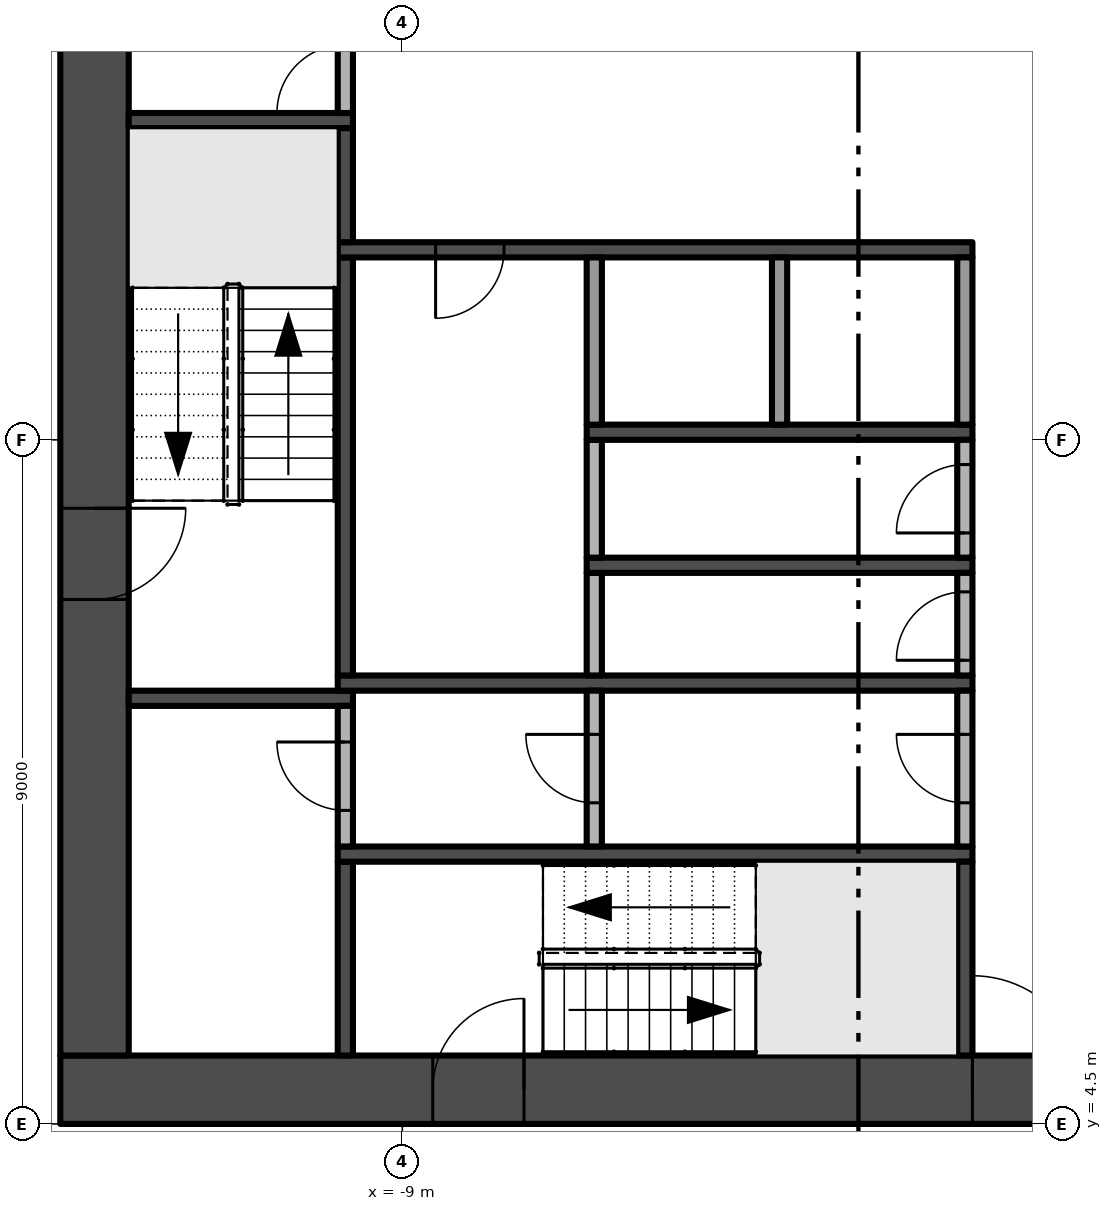
"""IFC4 building model, lengths in metres.
Left out: names, types, materials, properties, quantities, classifications, styles, units other than length and angle.
Written with IfcOpenShell. Run it as: python <this file> out.ifc"""

import sys

from ifc_helpers import new_model, si_unit, direction, frame, frame_2d, origin, place, context, subcontext, project, spatial, rectangle, extrude, element, fill, save


model = new_model("IFC4")
c1 = context("Model", 3, precision=1e-05, world=origin(), true_north=direction((0.0, 1.0)))
c2 = subcontext(c1, "Body", "Model", "MODEL_VIEW")
j1 = project(units=[si_unit("LENGTHUNIT", "METRE"), si_unit("PLANEANGLEUNIT", "RADIAN")], contexts=[c1])
p1 = place(None, origin())
s1 = spatial("IfcSite", under=j1, at=p1, CompositionType="ELEMENT")
p2 = place(p1, origin())
s2 = spatial("IfcBuilding", under=s1, at=p2, CompositionType="ELEMENT")
p3 = place(p2, frame((0.0, 0.0, 49.2)))
s3 = spatial("IfcBuildingStorey", under=s2, at=p3, CompositionType="ELEMENT", Elevation=49.2)
p4 = place(p3, frame((-13.5, 4.95, -0.3), z_axis=(0.0, 0.0, 1.0), x_axis=(1.0, 0.0, 0.0)))
e1 = element("IfcWall", 1, at=p4, inside=s3, PredefinedType="SHEAR", context=c2, shape_type="SweptSolid", body=[
    extrude(rectangle(XDim=27.0, YDim=0.9, at=frame_2d((13.5, 0.0))), origin(), (0.0, 0.0, 1.0), 3.8),
])
p5 = place(p4, frame((12.0, 0.0, 0.3)))
e2 = element("IfcOpeningElement", 2, at=p5, cuts=e1, PredefinedType="OPENING", context=c2, shape_type="SweptSolid", body=[
    extrude(rectangle(XDim=3.0, YDim=2.4, at=frame_2d((1.5, 1.2))), frame((0.0, 0.46, 0.0), z_axis=(0.0, -1.0, 0.0), x_axis=(1.0, 0.0, 0.0)), (0.0, 0.0, 1.0), 0.92),
])
p6 = place(p4, frame((4.9, 0.0, 0.3)))
e3 = element("IfcOpeningElement", 3, at=p6, cuts=e1, PredefinedType="OPENING", context=c2, shape_type="SweptSolid", body=[
    extrude(rectangle(XDim=1.2, YDim=2.2, at=frame_2d((0.6, 1.1))), frame((0.0, 0.46, 0.0), z_axis=(0.0, -1.0, 0.0), x_axis=(1.0, 0.0, 0.0)), (0.0, 0.0, 1.0), 0.92),
])
p7 = place(p4, frame((20.75, 0.0, 0.3)))
e4 = element("IfcOpeningElement", 4, at=p7, cuts=e1, PredefinedType="OPENING", context=c2, shape_type="SweptSolid", body=[
    extrude(rectangle(XDim=1.5, YDim=2.2, at=frame_2d((0.75, 1.1))), frame((0.0, 0.46, 0.0), z_axis=(0.0, -1.0, 0.0), x_axis=(1.0, 0.0, 0.0)), (0.0, 0.0, 1.0), 0.92),
])
p8 = place(p4, frame((17.4, 0.0, 0.3)))
e5 = element("IfcOpeningElement", 5, at=p8, cuts=e1, PredefinedType="OPENING", context=c2, shape_type="SweptSolid", body=[
    extrude(rectangle(XDim=1.2, YDim=2.2, at=frame_2d((0.6, 1.1))), frame((0.0, 0.46, 0.0), z_axis=(0.0, -1.0, 0.0), x_axis=(1.0, 0.0, 0.0)), (0.0, 0.0, 1.0), 0.92),
])
p9 = place(p3, frame((-13.05, 21.6, -0.3), z_axis=(0.0, 0.0, 1.0), x_axis=(0.0, -1.0, 0.0)))
e6 = element("IfcWall", 6, at=p9, inside=s3, PredefinedType="SHEAR", context=c2, shape_type="SweptSolid", body=[
    extrude(rectangle(XDim=16.2, YDim=0.9, at=frame_2d((8.1, 0.0))), origin(), (0.0, 0.0, 1.0), 3.8),
])
p10 = place(p9, frame((9.0, 0.0, 0.3)))
e7 = element("IfcOpeningElement", 7, at=p10, cuts=e6, PredefinedType="OPENING", context=c2, shape_type="SweptSolid", body=[
    extrude(rectangle(XDim=1.2, YDim=2.2, at=frame_2d((0.6, 1.1))), frame((0.0, 0.46, 0.0), z_axis=(0.0, -1.0, 0.0), x_axis=(1.0, 0.0, 0.0)), (0.0, 0.0, 1.0), 0.92),
])
for number, where, z_axis, x_axis in (
    (8, (-12.6, 10.1, 0.0), (0.0, 0.0, 1.0), (1.0, 0.0, 0.0)),
    (9, (-12.6, 17.7, 0.0), (0.0, 0.0, 1.0), (1.0, 0.0, 0.0)),
):
    element("IfcWall", number, at=place(p3, frame(where, z_axis=z_axis, x_axis=x_axis)), inside=s3, PredefinedType="SHEAR", context=c2, shape_type="SweptSolid", body=[
        extrude(rectangle(XDim=2.95, YDim=0.2, at=frame_2d((1.475, 0.0))), origin(), (0.0, 0.0, 1.0), 3.5),
    ])
p11 = place(p3, frame((-9.75, 5.4, 0.0), z_axis=(0.0, 0.0, 1.0), x_axis=(0.0, 1.0, 0.0)))
e10 = element("IfcWall", 10, at=p11, inside=s3, PredefinedType="SHEAR", context=c2, shape_type="SweptSolid", body=[
    extrude(rectangle(XDim=2.55, YDim=0.2, at=frame_2d((1.275, 0.0))), origin(), (0.0, 0.0, 1.0), 3.5),
])
p12 = place(p3, frame((-9.85, 8.05, 0.0), z_axis=(0.0, 0.0, 1.0), x_axis=(1.0, 0.0, 0.0)))
e11 = element("IfcWall", 11, at=p12, inside=s3, PredefinedType="SHEAR", context=c2, shape_type="SweptSolid", body=[
    extrude(rectangle(XDim=8.35, YDim=0.2, at=frame_2d((4.175, 0.0))), origin(), (0.0, 0.0, 1.0), 3.5),
])
p13 = place(p3, frame((-9.75, 8.15, 0.0), z_axis=(0.0, 0.0, 1.0), x_axis=(0.0, 1.0, 0.0)))
e12 = element("IfcWall", 12, at=p13, inside=s3, PredefinedType="PARTITIONING", context=c2, shape_type="SweptSolid", body=[
    extrude(rectangle(XDim=1.85, YDim=0.2, at=frame_2d((0.925, 0.0))), origin(), (0.0, 0.0, 1.0), 3.5),
])
p14 = place(p13, frame((0.475, 0.0, 0.0)))
e13 = element("IfcOpeningElement", 13, at=p14, cuts=e12, PredefinedType="OPENING", context=c2, shape_type="SweptSolid", body=[
    extrude(rectangle(XDim=0.9, YDim=2.1, at=frame_2d((0.45, 1.05))), frame((0.0, 0.11, 0.0), z_axis=(0.0, -1.0, 0.0), x_axis=(1.0, 0.0, 0.0)), (0.0, 0.0, 1.0), 0.22),
])
p15 = place(p3, frame((-9.85, 10.3, 0.0), z_axis=(0.0, 0.0, 1.0), x_axis=(1.0, 0.0, 0.0)))
e14 = element("IfcWall", 14, at=p15, inside=s3, PredefinedType="SHEAR", context=c2, shape_type="SweptSolid", body=[
    extrude(rectangle(XDim=8.35, YDim=0.2, at=frame_2d((4.175, 0.0))), origin(), (0.0, 0.0, 1.0), 3.5),
])
p16 = place(p3, frame((-9.75, 10.4, 0.0), z_axis=(0.0, 0.0, 1.0), x_axis=(0.0, 1.0, 0.0)))
e15 = element("IfcWall", 15, at=p16, inside=s3, PredefinedType="SHEAR", context=c2, shape_type="SweptSolid", body=[
    extrude(rectangle(XDim=5.5, YDim=0.2, at=frame_2d((2.75, 0.0))), origin(), (0.0, 0.0, 1.0), 3.5),
])
p17 = place(p3, frame((-1.5, 16.0, 0.0), z_axis=(0.0, 0.0, 1.0), x_axis=(-1.0, 0.0, 0.0)))
e16 = element("IfcWall", 16, at=p17, inside=s3, PredefinedType="SHEAR", context=c2, shape_type="SweptSolid", body=[
    extrude(rectangle(XDim=8.35, YDim=0.2, at=frame_2d((4.175, 0.0))), origin(), (0.0, 0.0, 1.0), 3.5),
])
p18 = place(p17, frame((6.162, 0.0, 0.0)))
e17 = element("IfcOpeningElement", 17, at=p18, cuts=e16, PredefinedType="OPENING", context=c2, shape_type="SweptSolid", body=[
    extrude(rectangle(XDim=0.9, YDim=2.1, at=frame_2d((0.45, 1.05))), frame((0.0, 0.11, 0.0), z_axis=(0.0, -1.0, 0.0), x_axis=(1.0, 0.0, 0.0)), (0.0, 0.0, 1.0), 0.22),
])
p19 = place(p3, frame((-9.75, 16.1, 0.0), z_axis=(0.0, 0.0, 1.0), x_axis=(0.0, 1.0, 0.0)))
e18 = element("IfcWall", 18, at=p19, inside=s3, PredefinedType="SHEAR", context=c2, shape_type="SweptSolid", body=[
    extrude(rectangle(XDim=1.5, YDim=0.2, at=frame_2d((0.75, 0.0))), origin(), (0.0, 0.0, 1.0), 3.5),
])
p20 = place(p3, frame((-9.75, 17.8, 0.0), z_axis=(0.0, 0.0, 1.0), x_axis=(0.0, 1.0, 0.0)))
e19 = element("IfcWall", 19, at=p20, inside=s3, PredefinedType="PARTITIONING", context=c2, shape_type="SweptSolid", body=[
    extrude(rectangle(XDim=1.4, YDim=0.2, at=frame_2d((0.7, 0.0))), origin(), (0.0, 0.0, 1.0), 3.5),
])
p21 = place(p20, origin())
e20 = element("IfcOpeningElement", 20, at=p21, cuts=e19, PredefinedType="OPENING", context=c2, shape_type="SweptSolid", body=[
    extrude(rectangle(XDim=0.9, YDim=2.1, at=frame_2d((0.45, 1.05))), frame((0.0, 0.11, 0.0), z_axis=(0.0, -1.0, 0.0), x_axis=(1.0, 0.0, 0.0)), (0.0, 0.0, 1.0), 0.22),
])
p22 = place(p3, frame((-6.475, 8.15, 0.0), z_axis=(0.0, 0.0, 1.0), x_axis=(0.0, 1.0, 0.0)))
e21 = element("IfcWall", 21, at=p22, inside=s3, PredefinedType="PARTITIONING", context=c2, shape_type="SweptSolid", body=[
    extrude(rectangle(XDim=2.05, YDim=0.2, at=frame_2d((1.025, 0.0))), origin(), (0.0, 0.0, 1.0), 3.5),
])
p23 = place(p22, frame((0.575, 0.0, 0.0)))
e22 = element("IfcOpeningElement", 22, at=p23, cuts=e21, PredefinedType="OPENING", context=c2, shape_type="SweptSolid", body=[
    extrude(rectangle(XDim=0.9, YDim=2.1, at=frame_2d((0.45, 1.05))), frame((0.0, 0.11, 0.0), z_axis=(0.0, -1.0, 0.0), x_axis=(1.0, 0.0, 0.0)), (0.0, 0.0, 1.0), 0.22),
])
p24 = place(p3, frame((-6.475, 10.4, 0.0), z_axis=(0.0, 0.0, 1.0), x_axis=(0.0, 1.0, 0.0)))
e23 = element("IfcWall", 23, at=p24, inside=s3, PredefinedType="PARTITIONING", context=c2, shape_type="SweptSolid", body=[
    extrude(rectangle(XDim=1.35, YDim=0.2, at=frame_2d((0.675, 0.0))), origin(), (0.0, 0.0, 1.0), 3.5),
])
p25 = place(p3, frame((-6.575, 11.85, 0.0), z_axis=(0.0, 0.0, 1.0), x_axis=(1.0, 0.0, 0.0)))
e24 = element("IfcWall", 24, at=p25, inside=s3, PredefinedType="SHEAR", context=c2, shape_type="SweptSolid", body=[
    extrude(rectangle(XDim=5.075, YDim=0.2, at=frame_2d((2.538, 0.0))), origin(), (0.0, 0.0, 1.0), 3.5),
])
p26 = place(p3, frame((-6.475, 11.95, 0.0), z_axis=(0.0, 0.0, 1.0), x_axis=(0.0, 1.0, 0.0)))
e25 = element("IfcWall", 25, at=p26, inside=s3, PredefinedType="PARTITIONING", context=c2, shape_type="SweptSolid", body=[
    extrude(rectangle(XDim=1.55, YDim=0.2, at=frame_2d((0.775, 0.0))), origin(), (0.0, 0.0, 1.0), 3.5),
])
p27 = place(p3, frame((-6.575, 13.6, 0.0), z_axis=(0.0, 0.0, 1.0), x_axis=(1.0, 0.0, 0.0)))
e26 = element("IfcWall", 26, at=p27, inside=s3, PredefinedType="SHEAR", context=c2, shape_type="SweptSolid", body=[
    extrude(rectangle(XDim=5.075, YDim=0.2, at=frame_2d((2.538, 0.0))), origin(), (0.0, 0.0, 1.0), 3.5),
])
for number, where, z_axis, x_axis in (
    (27, (-6.475, 13.7, 0.0), (0.0, 0.0, 1.0), (0.0, 1.0, 0.0)),
    (28, (-4.037, 13.7, 0.0), (0.0, 0.0, 1.0), (0.0, 1.0, 0.0)),
):
    element("IfcWall", number, at=place(p3, frame(where, z_axis=z_axis, x_axis=x_axis)), inside=s3, PredefinedType="PARTITIONING", context=c2, shape_type="SweptSolid", body=[
        extrude(rectangle(XDim=2.2, YDim=0.2, at=frame_2d((1.1, 0.0))), origin(), (0.0, 0.0, 1.0), 3.5),
    ])
p28 = place(p3, frame((-1.6, 5.4, 0.0), z_axis=(0.0, 0.0, 1.0), x_axis=(0.0, 1.0, 0.0)))
e29 = element("IfcWall", 29, at=p28, inside=s3, PredefinedType="SHEAR", context=c2, shape_type="SweptSolid", body=[
    extrude(rectangle(XDim=2.55, YDim=0.2, at=frame_2d((1.275, 0.0))), origin(), (0.0, 0.0, 1.0), 3.5),
])
p29 = place(p3, frame((-1.6, 8.15, 0.0), z_axis=(0.0, 0.0, 1.0), x_axis=(0.0, 1.0, 0.0)))
e30 = element("IfcWall", 30, at=p29, inside=s3, PredefinedType="PARTITIONING", context=c2, shape_type="SweptSolid", body=[
    extrude(rectangle(XDim=2.05, YDim=0.2, at=frame_2d((1.025, 0.0))), origin(), (0.0, 0.0, 1.0), 3.5),
])
p30 = place(p29, frame((0.575, 0.0, 0.0)))
e31 = element("IfcOpeningElement", 31, at=p30, cuts=e30, PredefinedType="OPENING", context=c2, shape_type="SweptSolid", body=[
    extrude(rectangle(XDim=0.9, YDim=2.1, at=frame_2d((0.45, 1.05))), frame((0.0, 0.11, 0.0), z_axis=(0.0, -1.0, 0.0), x_axis=(1.0, 0.0, 0.0)), (0.0, 0.0, 1.0), 0.22),
])
p31 = place(p3, frame((-1.6, 10.4, 0.0), z_axis=(0.0, 0.0, 1.0), x_axis=(0.0, 1.0, 0.0)))
e32 = element("IfcWall", 32, at=p31, inside=s3, PredefinedType="PARTITIONING", context=c2, shape_type="SweptSolid", body=[
    extrude(rectangle(XDim=1.35, YDim=0.2, at=frame_2d((0.675, 0.0))), origin(), (0.0, 0.0, 1.0), 3.5),
])
p32 = place(p31, frame((0.2, 0.0, 0.0)))
e33 = element("IfcOpeningElement", 33, at=p32, cuts=e32, PredefinedType="OPENING", context=c2, shape_type="SweptSolid", body=[
    extrude(rectangle(XDim=0.9, YDim=2.1, at=frame_2d((0.45, 1.05))), frame((0.0, 0.11, 0.0), z_axis=(0.0, -1.0, 0.0), x_axis=(1.0, 0.0, 0.0)), (0.0, 0.0, 1.0), 0.22),
])
p33 = place(p3, frame((-1.6, 11.95, 0.0), z_axis=(0.0, 0.0, 1.0), x_axis=(0.0, 1.0, 0.0)))
e34 = element("IfcWall", 34, at=p33, inside=s3, PredefinedType="PARTITIONING", context=c2, shape_type="SweptSolid", body=[
    extrude(rectangle(XDim=1.55, YDim=0.2, at=frame_2d((0.775, 0.0))), origin(), (0.0, 0.0, 1.0), 3.5),
])
p34 = place(p33, frame((0.325, 0.0, 0.0)))
e35 = element("IfcOpeningElement", 35, at=p34, cuts=e34, PredefinedType="OPENING", context=c2, shape_type="SweptSolid", body=[
    extrude(rectangle(XDim=0.9, YDim=2.1, at=frame_2d((0.45, 1.05))), frame((0.0, 0.11, 0.0), z_axis=(0.0, -1.0, 0.0), x_axis=(1.0, 0.0, 0.0)), (0.0, 0.0, 1.0), 0.22),
])
p35 = place(p3, frame((-1.6, 13.7, 0.0), z_axis=(0.0, 0.0, 1.0), x_axis=(0.0, 1.0, 0.0)))
e36 = element("IfcWall", 36, at=p35, inside=s3, PredefinedType="PARTITIONING", context=c2, shape_type="SweptSolid", body=[
    extrude(rectangle(XDim=2.2, YDim=0.2, at=frame_2d((1.1, 0.0))), origin(), (0.0, 0.0, 1.0), 3.5),
])
p36 = place(p5, frame((3.0, 0.0, 0.0), z_axis=(0.0, 0.0, 1.0), x_axis=(-1.0, 0.0, 0.0)))
e37 = element("IfcDoor", 37, at=p36, inside=s3, OperationType="DOUBLE_DOOR_SINGLE_SWING", PredefinedType="DOOR", context=c2, shape_type="SweptSolid", body=[
    extrude(rectangle(XDim=3.0, YDim=2.4, at=frame_2d((1.5, 1.2))), frame((0.0, 0.025, 0.0), z_axis=(0.0, -1.0, 0.0), x_axis=(1.0, 0.0, 0.0)), (0.0, 0.0, 1.0), 0.05),
])
fill(e2, e37)
p37 = place(p10, frame((1.2, 0.0, 0.0), z_axis=(0.0, 0.0, 1.0), x_axis=(-1.0, 0.0, 0.0)))
e38 = element("IfcDoor", 38, at=p37, inside=s3, OperationType="SINGLE_SWING_RIGHT", PredefinedType="DOOR", context=c2, shape_type="SweptSolid", body=[
    extrude(rectangle(XDim=1.2, YDim=2.2, at=frame_2d((0.6, 1.1))), frame((0.0, 0.025, 0.0), z_axis=(0.0, -1.0, 0.0), x_axis=(1.0, 0.0, 0.0)), (0.0, 0.0, 1.0), 0.05),
])
fill(e7, e38)
p38 = place(p6, frame((1.2, 0.0, 0.0), z_axis=(0.0, 0.0, 1.0), x_axis=(-1.0, 0.0, 0.0)))
e39 = element("IfcDoor", 39, at=p38, inside=s3, OperationType="SINGLE_SWING_LEFT", PredefinedType="DOOR", context=c2, shape_type="SweptSolid", body=[
    extrude(rectangle(XDim=1.2, YDim=2.2, at=frame_2d((0.6, 1.1))), frame((0.0, 0.025, 0.0), z_axis=(0.0, -1.0, 0.0), x_axis=(1.0, 0.0, 0.0)), (0.0, 0.0, 1.0), 0.05),
])
fill(e3, e39)
p39 = place(p18, origin())
e40 = element("IfcDoor", 40, at=p39, inside=s3, OperationType="SINGLE_SWING_RIGHT", PredefinedType="DOOR", context=c2, shape_type="SweptSolid", body=[
    extrude(rectangle(XDim=0.9, YDim=2.1, at=frame_2d((0.45, 1.05))), frame((0.0, 0.025, 0.0), z_axis=(0.0, -1.0, 0.0), x_axis=(1.0, 0.0, 0.0)), (0.0, 0.0, 1.0), 0.05),
])
fill(e17, e40)
p40 = place(p30, origin())
e41 = element("IfcDoor", 41, at=p40, inside=s3, OperationType="SINGLE_SWING_RIGHT", PredefinedType="DOOR", context=c2, shape_type="SweptSolid", body=[
    extrude(rectangle(XDim=0.9, YDim=2.1, at=frame_2d((0.45, 1.05))), frame((0.0, 0.025, 0.0), z_axis=(0.0, -1.0, 0.0), x_axis=(1.0, 0.0, 0.0)), (0.0, 0.0, 1.0), 0.05),
])
fill(e31, e41)
p41 = place(p32, origin())
e42 = element("IfcDoor", 42, at=p41, inside=s3, OperationType="SINGLE_SWING_LEFT", PredefinedType="DOOR", context=c2, shape_type="SweptSolid", body=[
    extrude(rectangle(XDim=0.9, YDim=2.1, at=frame_2d((0.45, 1.05))), frame((0.0, 0.025, 0.0), z_axis=(0.0, -1.0, 0.0), x_axis=(1.0, 0.0, 0.0)), (0.0, 0.0, 1.0), 0.05),
])
fill(e33, e42)
p42 = place(p34, origin())
e43 = element("IfcDoor", 43, at=p42, inside=s3, OperationType="SINGLE_SWING_LEFT", PredefinedType="DOOR", context=c2, shape_type="SweptSolid", body=[
    extrude(rectangle(XDim=0.9, YDim=2.1, at=frame_2d((0.45, 1.05))), frame((0.0, 0.025, 0.0), z_axis=(0.0, -1.0, 0.0), x_axis=(1.0, 0.0, 0.0)), (0.0, 0.0, 1.0), 0.05),
])
fill(e35, e43)
p43 = place(p21, origin())
e44 = element("IfcDoor", 44, at=p43, inside=s3, OperationType="SINGLE_SWING_LEFT", PredefinedType="DOOR", context=c2, shape_type="SweptSolid", body=[
    extrude(rectangle(XDim=0.9, YDim=2.1, at=frame_2d((0.45, 1.05))), frame((0.0, 0.025, 0.0), z_axis=(0.0, -1.0, 0.0), x_axis=(1.0, 0.0, 0.0)), (0.0, 0.0, 1.0), 0.05),
])
fill(e20, e44)
p44 = place(p23, origin())
e45 = element("IfcDoor", 45, at=p44, inside=s3, OperationType="SINGLE_SWING_RIGHT", PredefinedType="DOOR", context=c2, shape_type="SweptSolid", body=[
    extrude(rectangle(XDim=0.9, YDim=2.1, at=frame_2d((0.45, 1.05))), frame((0.0, 0.025, 0.0), z_axis=(0.0, -1.0, 0.0), x_axis=(1.0, 0.0, 0.0)), (0.0, 0.0, 1.0), 0.05),
])
fill(e22, e45)
p45 = place(p14, origin())
e46 = element("IfcDoor", 46, at=p45, inside=s3, OperationType="SINGLE_SWING_RIGHT", PredefinedType="DOOR", context=c2, shape_type="SweptSolid", body=[
    extrude(rectangle(XDim=0.9, YDim=2.1, at=frame_2d((0.45, 1.05))), frame((0.0, 0.025, 0.0), z_axis=(0.0, -1.0, 0.0), x_axis=(1.0, 0.0, 0.0)), (0.0, 0.0, 1.0), 0.05),
])
fill(e13, e46)
save(model, sys.argv[1])
